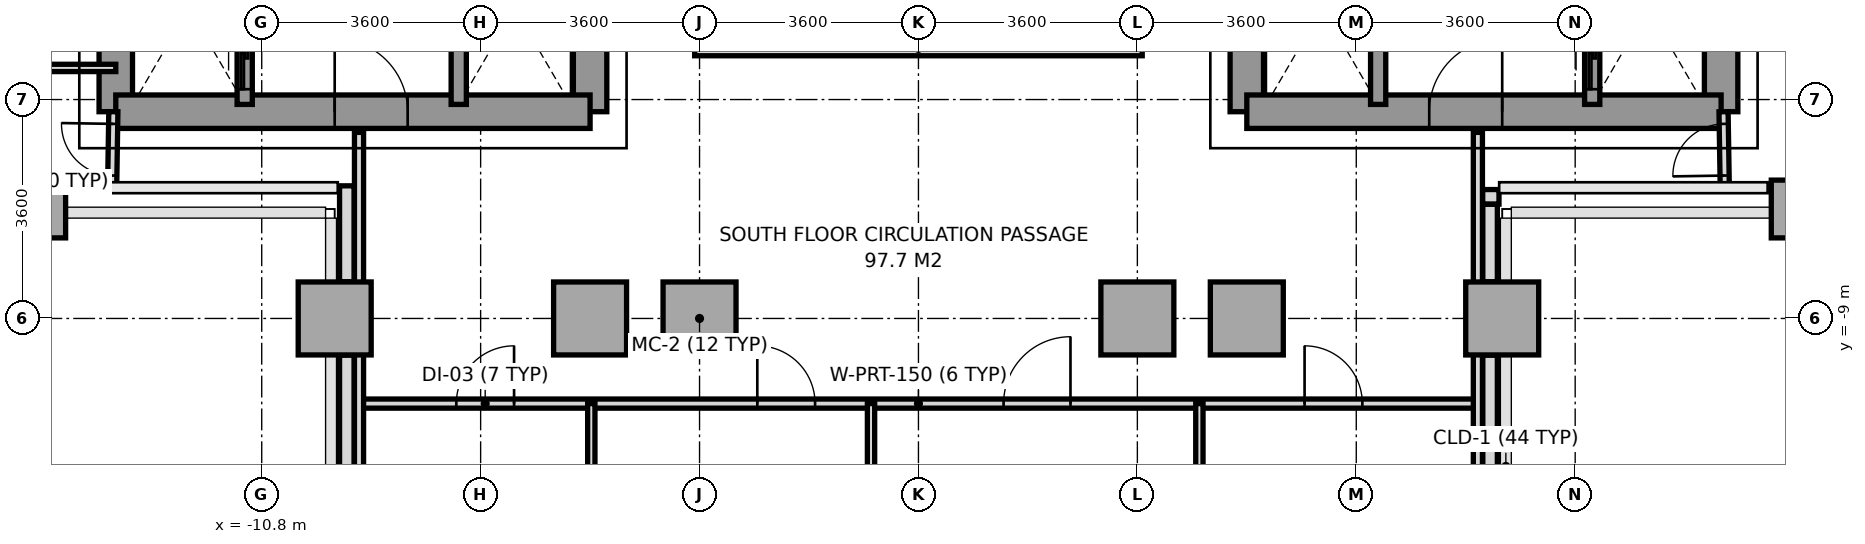
"""IFC4 building model, lengths in metres.
Left out: names, types, materials, properties, quantities, classifications, styles, units other than length and angle.
Written with IfcOpenShell. Run it as: python <this file> out.ifc"""

import sys

from ifc_helpers import new_model, si_unit, direction, frame, frame_2d, origin, origin_2d, place, context, subcontext, project, spatial, rectangle, extrude, source, transform, mapped, element, fill, save


model = new_model("IFC4")
c1 = context("Model", 3, precision=1e-05, world=origin(), true_north=direction((0.0, 1.0)))
c2 = subcontext(c1, "Body", "Model", "MODEL_VIEW")
j1 = project(units=[si_unit("LENGTHUNIT", "METRE"), si_unit("PLANEANGLEUNIT", "RADIAN")], contexts=[c1])
p1 = place(None, origin())
s1 = spatial("IfcSite", under=j1, at=p1, CompositionType="ELEMENT")
p2 = place(p1, origin())
s2 = spatial("IfcBuilding", under=s1, at=p2, CompositionType="ELEMENT")
p3 = place(p2, frame((0.0, 0.0, 78.2)))
s3 = spatial("IfcBuildingStorey", under=s2, at=p3, CompositionType="ELEMENT", Elevation=78.2)
m1 = source(origin(), c2, "Body", "SweptSolid", [
    extrude(rectangle(XDim=0.75, YDim=0.95, at=origin_2d()), origin(), (0.0, 0.0, 1.0), 3.2),
])
p4 = place(p3, frame((-14.4, -7.2, 0.0), z_axis=(0.0, 0.0, 1.0), x_axis=(1.0, 0.0, 0.0)))
e1 = element("IfcColumn", 1, at=p4, inside=s3, PredefinedType="COLUMN", context=c2, shape_type="MappedRepresentation", body=[
    mapped(m1, transform((0.0, 0.0, 0.0), x_axis=(1.0, 0.0, 0.0), y_axis=(0.0, 1.0, 0.0), z_axis=(0.0, 0.0, 1.0), scale=1.0)),
])
m2 = source(origin(), c2, "Body", "SweptSolid", [
    extrude(rectangle(XDim=1.2, YDim=1.2, at=origin_2d()), origin(), (0.0, 0.0, 1.0), 3.2),
])
for number, where, z_axis, x_axis in (
    (2, (-9.6, -9.0, 0.0), (0.0, 0.0, 1.0), (1.0, 0.0, 0.0)),
    (3, (-5.4, -9.0, 0.0), (0.0, 0.0, 1.0), (1.0, 0.0, 0.0)),
    (4, (-3.6, -9.0, 0.0), (0.0, 0.0, 1.0), (1.0, 0.0, 0.0)),
    (5, (3.6, -9.0, 0.0), (0.0, 0.0, 1.0), (1.0, 0.0, 0.0)),
    (6, (5.4, -9.0, 0.0), (0.0, 0.0, 1.0), (1.0, 0.0, 0.0)),
    (7, (9.6, -9.0, 0.0), (0.0, 0.0, 1.0), (1.0, 0.0, 0.0)),
):
    element("IfcColumn", number, at=place(p3, frame(where, z_axis=z_axis, x_axis=x_axis)), inside=s3, PredefinedType="COLUMN", context=c2, shape_type="MappedRepresentation", body=[
        mapped(m2, transform((0.0, 0.0, 0.0), x_axis=(1.0, 0.0, 0.0), y_axis=(0.0, 1.0, 0.0), z_axis=(0.0, 0.0, 1.0), scale=1.0)),
    ])
p5 = place(p3, frame((14.4, -7.2, 0.0), z_axis=(0.0, 0.0, 1.0), x_axis=(1.0, 0.0, 0.0)))
e8 = element("IfcColumn", 8, at=p5, inside=s3, PredefinedType="COLUMN", context=c2, shape_type="MappedRepresentation", body=[
    mapped(m1, transform((0.0, 0.0, 0.0), x_axis=(1.0, 0.0, 0.0), y_axis=(0.0, 1.0, 0.0), z_axis=(0.0, 0.0, 1.0), scale=1.0)),
])
p6 = place(p3, frame((9.547, -7.0, 0.0), z_axis=(0.0, 0.0, 1.0), x_axis=(-1.0, 0.0, 0.0)))
e9 = element("IfcWall", 9, at=p6, inside=s3, PredefinedType="PARAPET", context=c2, shape_type="SweptSolid", body=[
    extrude(rectangle(XDim=0.269, YDim=0.24, at=frame_2d((0.135, 0.0))), origin(), (0.0, 0.0, 1.0), 1.15),
])
p7 = place(p3, frame((9.4, -7.123, 0.0), z_axis=(0.0, 0.0, 1.0), x_axis=(0.0, -1.0, 0.0)))
e10 = element("IfcWall", 10, at=p7, inside=s3, PredefinedType="PARAPET", context=c2, shape_type="SweptSolid", body=[
    extrude(rectangle(XDim=1.274, YDim=0.24, at=frame_2d((0.637, 0.0))), origin(), (0.0, 0.0, 1.0), 1.15),
])
p8 = place(p3, frame((9.4, -9.603, 0.0), z_axis=(0.0, 0.0, 1.0), x_axis=(0.0, -1.0, 0.0)))
e11 = element("IfcWall", 11, at=p8, inside=s3, PredefinedType="PARAPET", context=c2, shape_type="SweptSolid", body=[
    extrude(rectangle(XDim=6.0, YDim=0.24, at=frame_2d((3.0, 0.0))), origin(), (0.0, 0.0, 1.0), 1.15),
])
p9 = place(p3, frame((-9.4, -15.358, 0.0), z_axis=(0.0, 0.0, 1.0), x_axis=(0.0, 1.0, 0.0)))
e12 = element("IfcWall", 12, at=p9, inside=s3, PredefinedType="PARAPET", context=c2, shape_type="SweptSolid", body=[
    extrude(rectangle(XDim=5.755, YDim=0.24, at=frame_2d((2.877, 0.0))), origin(), (0.0, 0.0, 1.0), 1.15),
])
p10 = place(p3, frame((-9.4, -8.397, 0.0), z_axis=(0.0, 0.0, 1.0), x_axis=(0.0, 1.0, 0.0)))
e13 = element("IfcWall", 13, at=p10, inside=s3, PredefinedType="PARAPET", context=c2, shape_type="SweptSolid", body=[
    extrude(rectangle(XDim=1.578, YDim=0.24, at=frame_2d((0.789, 0.0))), origin(), (0.0, 0.0, 1.0), 1.15),
])
p11 = place(p3, frame((-13.2, -5.6, 0.0), z_axis=(0.0, 0.0, 1.0), x_axis=(0.0, 1.0, 0.0)))
e14 = element("IfcWall", 14, at=p11, inside=s3, PredefinedType="SHEAR", context=c2, shape_type="SweptSolid", body=[
    extrude(rectangle(XDim=11.2, YDim=0.55, at=frame_2d((5.6, 0.0))), origin(), (0.0, 0.0, 1.0), 3.2),
])
p12 = place(p3, frame((-5.4, -5.6, 0.0), z_axis=(0.0, 0.0, 1.0), x_axis=(0.0, 1.0, 0.0)))
e15 = element("IfcWall", 15, at=p12, inside=s3, PredefinedType="SHEAR", context=c2, shape_type="SweptSolid", body=[
    extrude(rectangle(XDim=12.5, YDim=0.55, at=frame_2d((6.25, 0.0))), origin(), (0.0, 0.0, 1.0), 3.2),
])
p13 = place(p12, frame((4.55, 0.0, 0.0)))
e16 = element("IfcOpeningElement", 16, at=p13, cuts=e15, PredefinedType="OPENING", context=c2, shape_type="SweptSolid", body=[
    extrude(rectangle(XDim=1.2, YDim=2.2, at=frame_2d((0.6, 1.1))), frame((0.0, 0.285, 0.0), z_axis=(0.0, -1.0, 0.0), x_axis=(1.0, 0.0, 0.0)), (0.0, 0.0, 1.0), 0.57),
])
p14 = place(p12, frame((6.86, 0.0, 0.0)))
e17 = element("IfcOpeningElement", 17, at=p14, cuts=e15, PredefinedType="OPENING", context=c2, shape_type="SweptSolid", body=[
    extrude(rectangle(XDim=0.8, YDim=2.1, at=frame_2d((0.4, 1.05))), frame((0.0, 0.285, 0.0), z_axis=(0.0, -1.0, 0.0), x_axis=(1.0, 0.0, 0.0)), (0.0, 0.0, 1.0), 0.57),
])
p15 = place(p3, frame((-13.2, -5.6, 0.0), z_axis=(0.0, 0.0, 1.0), x_axis=(1.0, 0.0, 0.0)))
e18 = element("IfcWall", 18, at=p15, inside=s3, PredefinedType="SHEAR", context=c2, shape_type="SweptSolid", body=[
    extrude(rectangle(XDim=7.8, YDim=0.55, at=frame_2d((3.9, 0.0))), origin(), (0.0, 0.0, 1.0), 3.2),
])
p16 = place(p15, frame((3.6, 0.0, 0.0)))
e19 = element("IfcOpeningElement", 19, at=p16, cuts=e18, PredefinedType="OPENING", context=c2, shape_type="SweptSolid", body=[
    extrude(rectangle(XDim=1.2, YDim=2.2, at=frame_2d((0.6, 1.1))), frame((0.0, 0.285, 0.0), z_axis=(0.0, -1.0, 0.0), x_axis=(1.0, 0.0, 0.0)), (0.0, 0.0, 1.0), 0.57),
])
p17 = place(p3, frame((13.2, -5.6, 0.0), z_axis=(0.0, 0.0, 1.0), x_axis=(0.0, 1.0, 0.0)))
e20 = element("IfcWall", 20, at=p17, inside=s3, PredefinedType="SHEAR", context=c2, shape_type="SweptSolid", body=[
    extrude(rectangle(XDim=11.2, YDim=0.55, at=frame_2d((5.6, 0.0))), origin(), (0.0, 0.0, 1.0), 3.2),
])
p18 = place(p3, frame((5.4, -5.6, 0.0), z_axis=(0.0, 0.0, 1.0), x_axis=(0.0, 1.0, 0.0)))
e21 = element("IfcWall", 21, at=p18, inside=s3, PredefinedType="SHEAR", context=c2, shape_type="SweptSolid", body=[
    extrude(rectangle(XDim=12.5, YDim=0.55, at=frame_2d((6.25, 0.0))), origin(), (0.0, 0.0, 1.0), 3.2),
])
p19 = place(p18, frame((4.55, 0.0, 0.0)))
e22 = element("IfcOpeningElement", 22, at=p19, cuts=e21, PredefinedType="OPENING", context=c2, shape_type="SweptSolid", body=[
    extrude(rectangle(XDim=1.2, YDim=2.2, at=frame_2d((0.6, 1.1))), frame((0.0, 0.285, 0.0), z_axis=(0.0, -1.0, 0.0), x_axis=(1.0, 0.0, 0.0)), (0.0, 0.0, 1.0), 0.57),
])
p20 = place(p18, frame((6.86, 0.0, 0.0)))
e23 = element("IfcOpeningElement", 23, at=p20, cuts=e21, PredefinedType="OPENING", context=c2, shape_type="SweptSolid", body=[
    extrude(rectangle(XDim=0.8, YDim=2.1, at=frame_2d((0.4, 1.05))), frame((0.0, 0.285, 0.0), z_axis=(0.0, -1.0, 0.0), x_axis=(1.0, 0.0, 0.0)), (0.0, 0.0, 1.0), 0.57),
])
p21 = place(p3, frame((5.4, -5.6, 0.0), z_axis=(0.0, 0.0, 1.0), x_axis=(1.0, 0.0, 0.0)))
e24 = element("IfcWall", 24, at=p21, inside=s3, PredefinedType="SHEAR", context=c2, shape_type="SweptSolid", body=[
    extrude(rectangle(XDim=7.8, YDim=0.55, at=frame_2d((3.9, 0.0))), origin(), (0.0, 0.0, 1.0), 3.2),
])
p22 = place(p21, frame((3.0, 0.0, 0.0)))
e25 = element("IfcOpeningElement", 25, at=p22, cuts=e24, PredefinedType="OPENING", context=c2, shape_type="SweptSolid", body=[
    extrude(rectangle(XDim=1.2, YDim=2.2, at=frame_2d((0.6, 1.1))), frame((0.0, 0.285, 0.0), z_axis=(0.0, -1.0, 0.0), x_axis=(1.0, 0.0, 0.0)), (0.0, 0.0, 1.0), 0.57),
])
p23 = place(p3, frame((-11.08, -5.48, 0.0), z_axis=(0.0, 0.0, 1.0), x_axis=(0.0, 1.0, 0.0)))
e26 = element("IfcWall", 26, at=p23, inside=s3, PredefinedType="SOLIDWALL", context=c2, shape_type="SweptSolid", body=[
    extrude(rectangle(XDim=1.6, YDim=0.25, at=frame_2d((0.8, 0.0))), origin(), (0.0, 0.0, 1.0), 3.2),
])
p24 = place(p23, frame((0.25, 0.0, 0.0)))
e27 = element("IfcOpeningElement", 27, at=p24, cuts=e26, PredefinedType="OPENING", context=c2, shape_type="SweptSolid", body=[
    extrude(rectangle(XDim=1.1, YDim=2.2, at=frame_2d((0.55, 1.1))), frame((0.0, 0.135, 0.0), z_axis=(0.0, -1.0, 0.0), x_axis=(1.0, 0.0, 0.0)), (0.0, 0.0, 1.0), 0.27),
])
p25 = place(p3, frame((11.08, -5.48, 0.0), z_axis=(0.0, 0.0, 1.0), x_axis=(0.0, 1.0, 0.0)))
e28 = element("IfcWall", 28, at=p25, inside=s3, PredefinedType="SOLIDWALL", context=c2, shape_type="SweptSolid", body=[
    extrude(rectangle(XDim=1.6, YDim=0.25, at=frame_2d((0.8, 0.0))), origin(), (0.0, 0.0, 1.0), 3.2),
])
p26 = place(p25, frame((0.25, 0.0, 0.0)))
e29 = element("IfcOpeningElement", 29, at=p26, cuts=e28, PredefinedType="OPENING", context=c2, shape_type="SweptSolid", body=[
    extrude(rectangle(XDim=1.1, YDim=2.2, at=frame_2d((0.55, 1.1))), frame((0.0, 0.135, 0.0), z_axis=(0.0, -1.0, 0.0), x_axis=(1.0, 0.0, 0.0)), (0.0, 0.0, 1.0), 0.27),
])
for number, where, z_axis, x_axis in (
    (30, (-7.56, -5.48, 0.0), (0.0, 0.0, 1.0), (0.0, 1.0, 0.0)),
    (31, (7.56, -5.48, 0.0), (0.0, 0.0, 1.0), (0.0, 1.0, 0.0)),
):
    element("IfcWall", number, at=place(p3, frame(where, z_axis=z_axis, x_axis=x_axis)), inside=s3, PredefinedType="SOLIDWALL", context=c2, shape_type="SweptSolid", body=[
        extrude(rectangle(XDim=1.6, YDim=0.25, at=frame_2d((0.8, 0.0))), origin(), (0.0, 0.0, 1.0), 3.2),
    ])
p27 = place(p3, frame((-9.2, -10.4, 0.0), z_axis=(0.0, 0.0, 1.0), x_axis=(1.0, 0.0, 0.0)))
e32 = element("IfcWall", 32, at=p27, inside=s3, PredefinedType="PARTITIONING", context=c2, shape_type="SweptSolid", body=[
    extrude(rectangle(XDim=18.4, YDim=0.15, at=frame_2d((9.2, 0.0))), origin(), (0.0, 0.0, 1.0), 3.2),
])
p28 = place(p27, frame((1.6, 0.0, 0.0)))
e33 = element("IfcOpeningElement", 33, at=p28, cuts=e32, PredefinedType="OPENING", context=c2, shape_type="SweptSolid", body=[
    extrude(rectangle(XDim=0.95, YDim=2.15, at=frame_2d((0.475, 1.075))), frame((0.0, 0.085, 0.0), z_axis=(0.0, -1.0, 0.0), x_axis=(1.0, 0.0, 0.0)), (0.0, 0.0, 1.0), 0.17),
])
p29 = place(p27, frame((6.55, 0.0, 0.0)))
e34 = element("IfcOpeningElement", 34, at=p29, cuts=e32, PredefinedType="OPENING", context=c2, shape_type="SweptSolid", body=[
    extrude(rectangle(XDim=0.95, YDim=2.15, at=frame_2d((0.475, 1.075))), frame((0.0, 0.085, 0.0), z_axis=(0.0, -1.0, 0.0), x_axis=(1.0, 0.0, 0.0)), (0.0, 0.0, 1.0), 0.17),
])
p30 = place(p27, frame((10.6, 0.0, 0.0)))
e35 = element("IfcOpeningElement", 35, at=p30, cuts=e32, PredefinedType="OPENING", context=c2, shape_type="SweptSolid", body=[
    extrude(rectangle(XDim=1.1, YDim=2.2, at=frame_2d((0.55, 1.1))), frame((0.0, 0.085, 0.0), z_axis=(0.0, -1.0, 0.0), x_axis=(1.0, 0.0, 0.0)), (0.0, 0.0, 1.0), 0.17),
])
p31 = place(p27, frame((15.55, 0.0, 0.0)))
e36 = element("IfcOpeningElement", 36, at=p31, cuts=e32, PredefinedType="OPENING", context=c2, shape_type="SweptSolid", body=[
    extrude(rectangle(XDim=0.95, YDim=2.15, at=frame_2d((0.475, 1.075))), frame((0.0, 0.085, 0.0), z_axis=(0.0, -1.0, 0.0), x_axis=(1.0, 0.0, 0.0)), (0.0, 0.0, 1.0), 0.17),
])
for number, where, z_axis, x_axis in (
    (37, (-9.2, -15.68, 0.0), (0.0, 0.0, 1.0), (0.0, 1.0, 0.0)),
    (38, (9.2, -15.68, 0.0), (0.0, 0.0, 1.0), (0.0, 1.0, 0.0)),
):
    element("IfcWall", number, at=place(p3, frame(where, z_axis=z_axis, x_axis=x_axis)), inside=s3, PredefinedType="PARTITIONING", context=c2, shape_type="SweptSolid", body=[
        extrude(rectangle(XDim=9.74, YDim=0.15, at=frame_2d((4.87, 0.0))), origin(), (0.0, 0.0, 1.0), 2.65),
    ])
for number, where, z_axis, x_axis in (
    (39, (-5.38, -24.65, 0.0), (0.0, 0.0, 1.0), (0.0, 1.0, 0.0)),
    (40, (-0.78, -24.65, 0.0), (0.0, 0.0, 1.0), (0.0, 1.0, 0.0)),
    (41, (4.62, -24.65, 0.0), (0.0, 0.0, 1.0), (0.0, 1.0, 0.0)),
):
    element("IfcWall", number, at=place(p3, frame(where, z_axis=z_axis, x_axis=x_axis)), inside=s3, PredefinedType="PARTITIONING", context=c2, shape_type="SweptSolid", body=[
        extrude(rectangle(XDim=14.25, YDim=0.12, at=frame_2d((7.125, 0.0))), origin(), (0.0, 0.0, 1.0), 2.65),
    ])
p32 = place(p3, frame((-13.26, -6.85, 0.0), z_axis=(0.0, 0.0, 1.0), x_axis=(0.016013571389, 0.999871774545, 0.0)))
e42 = element("IfcWall", 42, at=p32, inside=s3, PredefinedType="PARTITIONING", context=c2, shape_type="SweptSolid", body=[
    extrude(rectangle(XDim=1.25, YDim=0.15, at=frame_2d((0.625, 0.0))), origin(), (0.0, 0.0, 1.0), 3.2),
])
p33 = place(p32, frame((0.2, 0.0, 0.0)))
e43 = element("IfcOpeningElement", 43, at=p33, cuts=e42, PredefinedType="OPENING", context=c2, shape_type="SweptSolid", body=[
    extrude(rectangle(XDim=0.85, YDim=2.1, at=frame_2d((0.425, 1.05))), frame((0.0, 0.085, 0.0), z_axis=(0.0, -1.0, 0.0), x_axis=(1.0, 0.0, 0.0)), (0.0, 0.0, 1.0), 0.17),
])
p34 = place(p3, frame((-24.57, -4.88, 0.0), z_axis=(0.0, 0.0, 1.0), x_axis=(1.0, 0.0, 0.0)))
e44 = element("IfcWall", 44, at=p34, inside=s3, PredefinedType="PARTITIONING", context=c2, shape_type="SweptSolid", body=[
    extrude(rectangle(XDim=11.37, YDim=0.12, at=frame_2d((5.685, 0.0))), origin(), (0.0, 0.0, 1.0), 2.7),
])
p35 = place(p34, frame((2.2, 0.0, 0.0)))
e45 = element("IfcOpeningElement", 45, at=p35, cuts=e44, PredefinedType="OPENING", context=c2, shape_type="SweptSolid", body=[
    extrude(rectangle(XDim=0.95, YDim=2.15, at=frame_2d((0.475, 1.075))), frame((0.0, 0.07, 0.0), z_axis=(0.0, -1.0, 0.0), x_axis=(1.0, 0.0, 0.0)), (0.0, 0.0, 1.0), 0.14),
])
p36 = place(p3, frame((13.26, -6.85, 0.0), z_axis=(0.0, 0.0, 1.0), x_axis=(-0.016013571389, 0.999871774545, 0.0)))
e46 = element("IfcWall", 46, at=p36, inside=s3, PredefinedType="PARTITIONING", context=c2, shape_type="SweptSolid", body=[
    extrude(rectangle(XDim=1.25, YDim=0.15, at=frame_2d((0.625, 0.0))), origin(), (0.0, 0.0, 1.0), 3.2),
])
p37 = place(p36, frame((0.2, 0.0, 0.0)))
e47 = element("IfcOpeningElement", 47, at=p37, cuts=e46, PredefinedType="OPENING", context=c2, shape_type="SweptSolid", body=[
    extrude(rectangle(XDim=0.85, YDim=2.1, at=frame_2d((0.425, 1.05))), frame((0.0, 0.085, 0.0), z_axis=(0.0, -1.0, 0.0), x_axis=(1.0, 0.0, 0.0)), (0.0, 0.0, 1.0), 0.17),
])
p38 = place(p3, frame((-3.68, -4.56, 0.0), z_axis=(0.0, 0.0, 1.0), x_axis=(1.0, 0.0, 0.0)))
e48 = element("IfcWall", 48, at=p38, inside=s3, PredefinedType="PARAPET", context=c2, shape_type="SweptSolid", body=[
    extrude(rectangle(XDim=7.36, YDim=0.24, at=frame_2d((3.68, 0.0))), origin(), (0.0, 0.0, 1.0), 1.15),
])
m3 = source(origin(), c2, "Body", "SweptSolid", [
    extrude(rectangle(XDim=1.2, YDim=2.2, at=frame_2d((0.6, 1.1))), frame((0.0, 0.025, 0.0), z_axis=(0.0, -1.0, 0.0), x_axis=(1.0, 0.0, 0.0)), (0.0, 0.0, 1.0), 0.05),
])
p39 = place(p16, origin())
e49 = element("IfcDoor", 49, at=p39, inside=s3, OperationType="SINGLE_SWING_LEFT", PredefinedType="DOOR", context=c2, shape_type="MappedRepresentation", body=[
    mapped(m3, transform((0.0, 0.0, 0.0), x_axis=(1.0, 0.0, 0.0), y_axis=(0.0, 1.0, 0.0), z_axis=(0.0, 0.0, 1.0), scale=1.0)),
])
fill(e19, e49)
p40 = place(p22, origin())
e50 = element("IfcDoor", 50, at=p40, inside=s3, OperationType="SINGLE_SWING_RIGHT", PredefinedType="DOOR", context=c2, shape_type="MappedRepresentation", body=[
    mapped(m3, transform((0.0, 0.0, 0.0), x_axis=(1.0, 0.0, 0.0), y_axis=(0.0, 1.0, 0.0), z_axis=(0.0, 0.0, 1.0), scale=1.0)),
])
fill(e25, e50)
m4 = source(origin(), c2, "Body", "SweptSolid", [
    extrude(rectangle(XDim=1.1, YDim=2.2, at=frame_2d((0.55, 1.1))), frame((0.0, 0.025, 0.0), z_axis=(0.0, -1.0, 0.0), x_axis=(1.0, 0.0, 0.0)), (0.0, 0.0, 1.0), 0.05),
])
p41 = place(p24, origin())
e51 = element("IfcDoor", 51, at=p41, inside=s3, OperationType="SLIDING_TO_LEFT", PredefinedType="DOOR", context=c2, shape_type="MappedRepresentation", body=[
    mapped(m4, transform((0.0, 0.0, 0.0), x_axis=(1.0, 0.0, 0.0), y_axis=(0.0, 1.0, 0.0), z_axis=(0.0, 0.0, 1.0), scale=1.0)),
])
fill(e27, e51)
p42 = place(p26, origin())
e52 = element("IfcDoor", 52, at=p42, inside=s3, OperationType="SLIDING_TO_LEFT", PredefinedType="DOOR", context=c2, shape_type="MappedRepresentation", body=[
    mapped(m4, transform((0.0, 0.0, 0.0), x_axis=(1.0, 0.0, 0.0), y_axis=(0.0, 1.0, 0.0), z_axis=(0.0, 0.0, 1.0), scale=1.0)),
])
fill(e29, e52)
m5 = source(origin(), c2, "Body", "SweptSolid", [
    extrude(rectangle(XDim=0.95, YDim=2.15, at=frame_2d((0.475, 1.075))), frame((0.0, 0.025, 0.0), z_axis=(0.0, -1.0, 0.0), x_axis=(1.0, 0.0, 0.0)), (0.0, 0.0, 1.0), 0.05),
])
p43 = place(p28, origin())
e53 = element("IfcDoor", 53, at=p43, inside=s3, OperationType="SINGLE_SWING_RIGHT", PredefinedType="DOOR", context=c2, shape_type="MappedRepresentation", body=[
    mapped(m5, transform((0.0, 0.0, 0.0), x_axis=(1.0, 0.0, 0.0), y_axis=(0.0, 1.0, 0.0), z_axis=(0.0, 0.0, 1.0), scale=1.0)),
])
fill(e33, e53)
p44 = place(p29, origin())
e54 = element("IfcDoor", 54, at=p44, inside=s3, OperationType="SINGLE_SWING_LEFT", PredefinedType="DOOR", context=c2, shape_type="MappedRepresentation", body=[
    mapped(m5, transform((0.0, 0.0, 0.0), x_axis=(1.0, 0.0, 0.0), y_axis=(0.0, 1.0, 0.0), z_axis=(0.0, 0.0, 1.0), scale=1.0)),
])
fill(e34, e54)
p45 = place(p30, origin())
e55 = element("IfcDoor", 55, at=p45, inside=s3, OperationType="SINGLE_SWING_RIGHT", PredefinedType="DOOR", context=c2, shape_type="MappedRepresentation", body=[
    mapped(m4, transform((0.0, 0.0, 0.0), x_axis=(1.0, 0.0, 0.0), y_axis=(0.0, 1.0, 0.0), z_axis=(0.0, 0.0, 1.0), scale=1.0)),
])
fill(e35, e55)
p46 = place(p31, origin())
e56 = element("IfcDoor", 56, at=p46, inside=s3, OperationType="SINGLE_SWING_LEFT", PredefinedType="DOOR", context=c2, shape_type="MappedRepresentation", body=[
    mapped(m5, transform((0.0, 0.0, 0.0), x_axis=(1.0, 0.0, 0.0), y_axis=(0.0, 1.0, 0.0), z_axis=(0.0, 0.0, 1.0), scale=1.0)),
])
fill(e36, e56)
m6 = source(origin(), c2, "Body", "SweptSolid", [
    extrude(rectangle(XDim=0.85, YDim=2.1, at=frame_2d((0.425, 1.05))), frame((0.0, 0.025, 0.0), z_axis=(0.0, -1.0, 0.0), x_axis=(1.0, 0.0, 0.0)), (0.0, 0.0, 1.0), 0.05),
])
p47 = place(p33, origin())
e57 = element("IfcDoor", 57, at=p47, inside=s3, OperationType="SINGLE_SWING_RIGHT", PredefinedType="DOOR", context=c2, shape_type="MappedRepresentation", body=[
    mapped(m6, transform((0.0, 0.0, 0.0), x_axis=(1.0, 0.0, 0.0), y_axis=(0.0, 1.0, 0.0), z_axis=(0.0, 0.0, 1.0), scale=1.0)),
])
fill(e43, e57)
p48 = place(p37, origin())
e58 = element("IfcDoor", 58, at=p48, inside=s3, OperationType="SINGLE_SWING_LEFT", PredefinedType="DOOR", context=c2, shape_type="MappedRepresentation", body=[
    mapped(m6, transform((0.0, 0.0, 0.0), x_axis=(1.0, 0.0, 0.0), y_axis=(0.0, 1.0, 0.0), z_axis=(0.0, 0.0, 1.0), scale=1.0)),
])
fill(e47, e58)
save(model, sys.argv[1])
